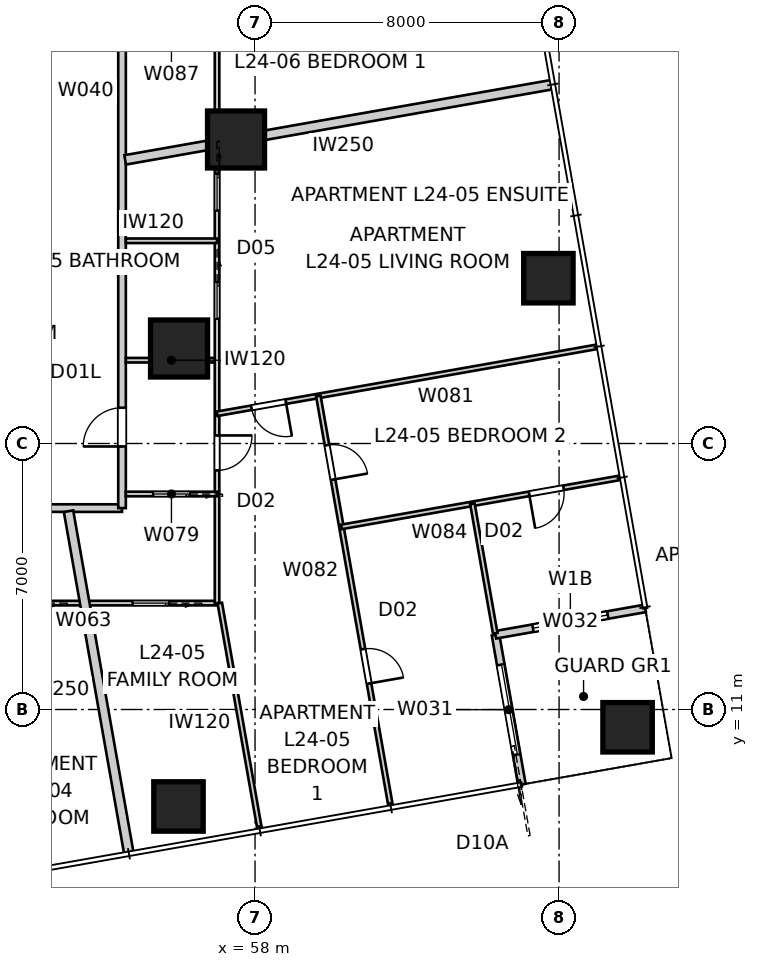
"""IFC4 building model, lengths in metres.
Left out: names, types, materials, properties, quantities, classifications, styles, units other than length and angle.
Written with IfcOpenShell. Run it as: python <this file> out.ifc"""

import sys

from ifc_helpers import new_model, si_unit, direction, frame, frame_2d, origin, origin_2d, place, context, subcontext, project, spatial, rectangle, extrude, element, fill, save


model = new_model("IFC4")
c1 = context("Model", 3, precision=1e-05, world=origin(), true_north=direction((0.0, 1.0)))
c2 = subcontext(c1, "Body", "Model", "MODEL_VIEW")
j1 = project(units=[si_unit("LENGTHUNIT", "METRE"), si_unit("PLANEANGLEUNIT", "RADIAN")], contexts=[c1])
p1 = place(None, origin())
s1 = spatial("IfcSite", under=j1, at=p1, CompositionType="ELEMENT")
p2 = place(p1, origin())
s2 = spatial("IfcBuilding", under=s1, at=p2, CompositionType="ELEMENT")
p3 = place(p2, frame((0.0, 0.0, 89.6)))
s3 = spatial("IfcBuildingStorey", under=s2, at=p3, CompositionType="ELEMENT", Elevation=89.6)
for number, where, z_axis, x_axis in (
    (1, (55.985, 8.448, 0.0), (0.0, 0.0, 1.0), (1.0, 0.0, 0.0)),
    (2, (67.803, 10.532, 0.0), (0.0, 0.0, 1.0), (1.0, 0.0, 0.0)),
    (3, (65.719, 22.35, 0.0), (0.0, 0.0, 1.0), (1.0, 0.0, 0.0)),
):
    element("IfcColumn", number, at=place(p3, frame(where, z_axis=z_axis, x_axis=x_axis)), inside=s3, PredefinedType="COLUMN", context=c2, shape_type="SweptSolid", body=[
        extrude(rectangle(XDim=1.3, YDim=1.3, at=origin_2d()), origin(), (0.0, 0.0, 1.0), 3.4),
    ])
for number, where, z_axis, x_axis in (
    (4, (57.5, 26.0, 0.0), (0.0, 0.0, 1.0), (1.0, 0.0, 0.0)),
    (5, (56.0, 20.5, 0.0), (0.0, 0.0, 1.0), (1.0, 0.0, 0.0)),
):
    element("IfcColumn", number, at=place(p3, frame(where, z_axis=z_axis, x_axis=x_axis)), inside=s3, PredefinedType="COLUMN", context=c2, shape_type="SweptSolid", body=[
        extrude(rectangle(XDim=1.5, YDim=1.5, at=origin_2d()), origin(), (0.0, 0.0, 1.0), 3.4),
    ])
p4 = place(p3, frame((65.022, 9.026, 0.0), z_axis=(0.0, 0.0, 1.0), x_axis=(-0.173646056486, 0.984808127031, 0.0)))
e6 = element("IfcWall", 6, at=p4, inside=s3, PredefinedType="SOLIDWALL", context=c2, shape_type="SweptSolid", body=[
    extrude(rectangle(XDim=4.0, YDim=0.2, at=frame_2d((2.0, 0.0))), origin(), (0.0, 0.0, 1.0), 3.25),
])
p5 = place(p4, frame((0.8, 0.0, 0.0)))
e7 = element("IfcOpeningElement", 7, at=p5, cuts=e6, PredefinedType="OPENING", context=c2, shape_type="SweptSolid", body=[
    extrude(rectangle(XDim=2.4, YDim=2.1, at=frame_2d((1.2, 1.05))), frame((0.0, 0.11, 0.0), z_axis=(0.0, -1.0, 0.0), x_axis=(1.0, 0.0, 0.0)), (0.0, 0.0, 1.0), 0.22),
])
p6 = place(p3, frame((64.328, 12.966, 0.0), z_axis=(0.0, 0.0, 1.0), x_axis=(0.984808127031, 0.173646056486, 0.0)))
e8 = element("IfcWall", 8, at=p6, inside=s3, PredefinedType="SOLIDWALL", context=c2, shape_type="SweptSolid", body=[
    extrude(rectangle(XDim=4.0, YDim=0.2, at=frame_2d((2.0, 0.0))), origin(), (0.0, 0.0, 1.0), 3.25),
])
p7 = place(p6, frame((1.0, 0.0, 0.45)))
e9 = element("IfcOpeningElement", 9, at=p7, cuts=e8, PredefinedType="OPENING", context=c2, shape_type="SweptSolid", body=[
    extrude(rectangle(XDim=2.0, YDim=1.8, at=frame_2d((1.0, 0.9))), frame((0.0, 0.11, 0.0), z_axis=(0.0, -1.0, 0.0), x_axis=(1.0, 0.0, 0.0)), (0.0, 0.0, 1.0), 0.22),
])
p8 = place(p3, frame((25.5, 16.3, 0.0), z_axis=(0.0, 0.0, 1.0), x_axis=(1.0, 0.0, 0.0)))
e10 = element("IfcWall", 10, at=p8, inside=s3, PredefinedType="PARTITIONING", context=c2, shape_type="SweptSolid", body=[
    extrude(rectangle(XDim=29.0, YDim=0.2, at=frame_2d((14.5, 0.0))), origin(), (0.0, 0.0, 1.0), 3.25),
])
p9 = place(p8, frame((20.896, 0.0, 0.0)))
e11 = element("IfcOpeningElement", 11, at=p9, cuts=e10, PredefinedType="OPENING", context=c2, shape_type="SweptSolid", body=[
    extrude(rectangle(XDim=1.02, YDim=2.34, at=frame_2d((0.51, 1.17))), frame((0.0, 0.11, 0.0), z_axis=(0.0, -1.0, 0.0), x_axis=(1.0, 0.0, 0.0)), (0.0, 0.0, 1.0), 0.22),
])
p10 = place(p8, frame((14.257, 0.0, 0.0)))
e12 = element("IfcOpeningElement", 12, at=p10, cuts=e10, PredefinedType="OPENING", context=c2, shape_type="SweptSolid", body=[
    extrude(rectangle(XDim=1.02, YDim=2.34, at=frame_2d((0.51, 1.17))), frame((0.0, 0.11, 0.0), z_axis=(0.0, -1.0, 0.0), x_axis=(1.0, 0.0, 0.0)), (0.0, 0.0, 1.0), 0.22),
])
p11 = place(p8, frame((3.857, 0.0, 0.0)))
e13 = element("IfcOpeningElement", 13, at=p11, cuts=e10, PredefinedType="OPENING", context=c2, shape_type="SweptSolid", body=[
    extrude(rectangle(XDim=1.02, YDim=2.34, at=frame_2d((0.51, 1.17))), frame((0.0, 0.11, 0.0), z_axis=(0.0, -1.0, 0.0), x_axis=(1.0, 0.0, 0.0)), (0.0, 0.0, 1.0), 0.22),
])
p12 = place(p3, frame((54.5, 16.3, 0.0), z_axis=(0.0, 0.0, 1.0), x_axis=(0.0, 1.0, 0.0)))
e14 = element("IfcWall", 14, at=p12, inside=s3, PredefinedType="PARTITIONING", context=c2, shape_type="SweptSolid", body=[
    extrude(rectangle(XDim=27.4, YDim=0.2, at=frame_2d((13.7, 0.0))), origin(), (0.0, 0.0, 1.0), 3.25),
])
p13 = place(p12, frame((19.308, 0.0, 0.0)))
e15 = element("IfcOpeningElement", 15, at=p13, cuts=e14, PredefinedType="OPENING", context=c2, shape_type="SweptSolid", body=[
    extrude(rectangle(XDim=1.02, YDim=2.34, at=frame_2d((0.51, 1.17))), frame((0.0, 0.11, 0.0), z_axis=(0.0, -1.0, 0.0), x_axis=(1.0, 0.0, 0.0)), (0.0, 0.0, 1.0), 0.22),
])
p14 = place(p12, frame((24.687, 0.0, 0.0)))
e16 = element("IfcOpeningElement", 16, at=p14, cuts=e14, PredefinedType="OPENING", context=c2, shape_type="SweptSolid", body=[
    extrude(rectangle(XDim=1.02, YDim=2.1, at=frame_2d((0.51, 1.05))), frame((0.0, 0.11, 0.0), z_axis=(0.0, -1.0, 0.0), x_axis=(1.0, 0.0, 0.0)), (0.0, 0.0, 1.0), 0.22),
])
p15 = place(p12, frame((1.622, 0.0, 0.0)))
e17 = element("IfcOpeningElement", 17, at=p15, cuts=e14, PredefinedType="OPENING", context=c2, shape_type="SweptSolid", body=[
    extrude(rectangle(XDim=1.02, YDim=2.1, at=frame_2d((0.51, 1.05))), frame((0.0, 0.11, 0.0), z_axis=(0.0, -1.0, 0.0), x_axis=(1.0, 0.0, 0.0)), (0.0, 0.0, 1.0), 0.22),
])
p16 = place(p3, frame((65.836, 27.448, 0.0), z_axis=(0.0, 0.0, 1.0), x_axis=(-0.98481000304, -0.173635416642, 0.0)))
e18 = element("IfcWall", 18, at=p16, inside=s3, PredefinedType="PARTITIONING", context=c2, shape_type="SweptSolid", body=[
    extrude(rectangle(XDim=11.427, YDim=0.25, at=frame_2d((5.713, 0.0))), origin(), (0.0, 0.0, 1.0), 3.25),
])
p17 = place(p3, frame((54.682, 7.203, 0.0), z_axis=(0.0, 0.0, 1.0), x_axis=(-0.173630137029, 0.984810933893, 0.0)))
e19 = element("IfcWall", 19, at=p17, inside=s3, PredefinedType="PARTITIONING", context=c2, shape_type="SweptSolid", body=[
    extrude(rectangle(XDim=9.154, YDim=0.25, at=frame_2d((4.577, 0.0))), origin(), (0.0, 0.0, 1.0), 3.25),
])
p18 = place(p3, frame((57.0, 13.8, 0.0), z_axis=(0.0, 0.0, 1.0), x_axis=(-1.0, 0.0, 0.0)))
e20 = element("IfcWall", 20, at=p18, inside=s3, PredefinedType="PARTITIONING", context=c2, shape_type="SweptSolid", body=[
    extrude(rectangle(XDim=34.0, YDim=0.12, at=frame_2d((17.0, 0.0))), origin(), (0.0, 0.0, 1.0), 2.55),
])
p19 = place(p18, frame((8.768, 0.0, 0.0)))
e21 = element("IfcOpeningElement", 21, at=p19, cuts=e20, PredefinedType="OPENING", context=c2, shape_type="SweptSolid", body=[
    extrude(rectangle(XDim=0.92, YDim=2.34, at=frame_2d((0.46, 1.17))), frame((0.0, 0.07, 0.0), z_axis=(0.0, -1.0, 0.0), x_axis=(1.0, 0.0, 0.0)), (0.0, 0.0, 1.0), 0.14),
])
p20 = place(p18, frame((10.995, 0.0, 0.0)))
e22 = element("IfcOpeningElement", 22, at=p20, cuts=e20, PredefinedType="OPENING", context=c2, shape_type="SweptSolid", body=[
    extrude(rectangle(XDim=0.92, YDim=2.34, at=frame_2d((0.46, 1.17))), frame((0.0, 0.07, 0.0), z_axis=(0.0, -1.0, 0.0), x_axis=(1.0, 0.0, 0.0)), (0.0, 0.0, 1.0), 0.14),
])
p21 = place(p18, frame((15.486, 0.0, 0.0)))
e23 = element("IfcOpeningElement", 23, at=p21, cuts=e20, PredefinedType="OPENING", context=c2, shape_type="SweptSolid", body=[
    extrude(rectangle(XDim=0.92, YDim=2.34, at=frame_2d((0.46, 1.17))), frame((0.0, 0.07, 0.0), z_axis=(0.0, -1.0, 0.0), x_axis=(1.0, 0.0, 0.0)), (0.0, 0.0, 1.0), 0.14),
])
p22 = place(p18, frame((4.804, 0.0, 0.0)))
e24 = element("IfcOpeningElement", 24, at=p22, cuts=e20, PredefinedType="OPENING", context=c2, shape_type="SweptSolid", body=[
    extrude(rectangle(XDim=0.96, YDim=2.1, at=frame_2d((0.48, 1.05))), frame((0.0, 0.07, 0.0), z_axis=(0.0, -1.0, 0.0), x_axis=(1.0, 0.0, 0.0)), (0.0, 0.0, 1.0), 0.14),
])
p23 = place(p18, frame((19.155, 0.0, 0.0)))
e25 = element("IfcOpeningElement", 25, at=p23, cuts=e20, PredefinedType="OPENING", context=c2, shape_type="SweptSolid", body=[
    extrude(rectangle(XDim=0.96, YDim=2.1, at=frame_2d((0.48, 1.05))), frame((0.0, 0.07, 0.0), z_axis=(0.0, -1.0, 0.0), x_axis=(1.0, 0.0, 0.0)), (0.0, 0.0, 1.0), 0.14),
])
p24 = place(p18, frame((31.473, 0.0, 0.0)))
e26 = element("IfcOpeningElement", 26, at=p24, cuts=e20, PredefinedType="OPENING", context=c2, shape_type="SweptSolid", body=[
    extrude(rectangle(XDim=0.96, YDim=2.1, at=frame_2d((0.48, 1.05))), frame((0.0, 0.07, 0.0), z_axis=(0.0, -1.0, 0.0), x_axis=(1.0, 0.0, 0.0)), (0.0, 0.0, 1.0), 0.14),
])
p25 = place(p18, frame((1.261, 0.0, 0.0)))
e27 = element("IfcOpeningElement", 27, at=p25, cuts=e20, PredefinedType="OPENING", context=c2, shape_type="SweptSolid", body=[
    extrude(rectangle(XDim=0.96, YDim=2.1, at=frame_2d((0.48, 1.05))), frame((0.0, 0.07, 0.0), z_axis=(0.0, -1.0, 0.0), x_axis=(1.0, 0.0, 0.0)), (0.0, 0.0, 1.0), 0.14),
])
p26 = place(p18, frame((22.627, 0.0, 0.0)))
e28 = element("IfcOpeningElement", 28, at=p26, cuts=e20, PredefinedType="OPENING", context=c2, shape_type="SweptSolid", body=[
    extrude(rectangle(XDim=0.96, YDim=2.1, at=frame_2d((0.48, 1.05))), frame((0.0, 0.07, 0.0), z_axis=(0.0, -1.0, 0.0), x_axis=(1.0, 0.0, 0.0)), (0.0, 0.0, 1.0), 0.14),
])
p27 = place(p3, frame((54.6, 20.192, 0.0), z_axis=(0.0, 0.0, 1.0), x_axis=(1.0, 0.0, 0.0)))
e29 = element("IfcWall", 29, at=p27, inside=s3, PredefinedType="PARTITIONING", context=c2, shape_type="SweptSolid", body=[
    extrude(rectangle(XDim=2.4, YDim=0.12, at=frame_2d((1.2, 0.0))), origin(), (0.0, 0.0, 1.0), 3.25),
])
p28 = place(p3, frame((57.0, 46.2, 0.0), z_axis=(0.0, 0.0, 1.0), x_axis=(0.0, -1.0, 0.0)))
e30 = element("IfcWall", 30, at=p28, inside=s3, PredefinedType="PARTITIONING", context=c2, shape_type="SweptSolid", body=[
    extrude(rectangle(XDim=32.4, YDim=0.12, at=frame_2d((16.2, 0.0))), origin(), (0.0, 0.0, 1.0), 2.55),
])
p29 = place(p28, frame((10.396, 0.0, 0.0)))
e31 = element("IfcOpeningElement", 31, at=p29, cuts=e30, PredefinedType="OPENING", context=c2, shape_type="SweptSolid", body=[
    extrude(rectangle(XDim=0.92, YDim=2.34, at=frame_2d((0.46, 1.17))), frame((0.0, 0.07, 0.0), z_axis=(0.0, -1.0, 0.0), x_axis=(1.0, 0.0, 0.0)), (0.0, 0.0, 1.0), 0.14),
])
p30 = place(p28, frame((7.587, 0.0, 0.0)))
e32 = element("IfcOpeningElement", 32, at=p30, cuts=e30, PredefinedType="OPENING", context=c2, shape_type="SweptSolid", body=[
    extrude(rectangle(XDim=0.92, YDim=2.34, at=frame_2d((0.46, 1.17))), frame((0.0, 0.07, 0.0), z_axis=(0.0, -1.0, 0.0), x_axis=(1.0, 0.0, 0.0)), (0.0, 0.0, 1.0), 0.14),
])
p31 = place(p28, frame((3.843, 0.0, 0.0)))
e33 = element("IfcOpeningElement", 33, at=p31, cuts=e30, PredefinedType="OPENING", context=c2, shape_type="SweptSolid", body=[
    extrude(rectangle(XDim=0.92, YDim=2.34, at=frame_2d((0.46, 1.17))), frame((0.0, 0.07, 0.0), z_axis=(0.0, -1.0, 0.0), x_axis=(1.0, 0.0, 0.0)), (0.0, 0.0, 1.0), 0.14),
])
p32 = place(p28, frame((27.988, 0.0, 0.0)))
e34 = element("IfcOpeningElement", 34, at=p32, cuts=e30, PredefinedType="OPENING", context=c2, shape_type="SweptSolid", body=[
    extrude(rectangle(XDim=0.92, YDim=2.34, at=frame_2d((0.46, 1.17))), frame((0.0, 0.07, 0.0), z_axis=(0.0, -1.0, 0.0), x_axis=(1.0, 0.0, 0.0)), (0.0, 0.0, 1.0), 0.14),
])
p33 = place(p28, frame((23.957, 0.0, 0.0)))
e35 = element("IfcOpeningElement", 35, at=p33, cuts=e30, PredefinedType="OPENING", context=c2, shape_type="SweptSolid", body=[
    extrude(rectangle(XDim=0.96, YDim=2.1, at=frame_2d((0.48, 1.05))), frame((0.0, 0.07, 0.0), z_axis=(0.0, -1.0, 0.0), x_axis=(1.0, 0.0, 0.0)), (0.0, 0.0, 1.0), 0.14),
])
p34 = place(p28, frame((21.108, 0.0, 0.0)))
e36 = element("IfcOpeningElement", 36, at=p34, cuts=e30, PredefinedType="OPENING", context=c2, shape_type="SweptSolid", body=[
    extrude(rectangle(XDim=0.96, YDim=2.1, at=frame_2d((0.48, 1.05))), frame((0.0, 0.07, 0.0), z_axis=(0.0, -1.0, 0.0), x_axis=(1.0, 0.0, 0.0)), (0.0, 0.0, 1.0), 0.14),
])
p35 = place(p3, frame((57.0, 16.671, 0.0), z_axis=(0.0, 0.0, 1.0), x_axis=(-1.0, 0.0, 0.0)))
e37 = element("IfcWall", 37, at=p35, inside=s3, PredefinedType="PARTITIONING", context=c2, shape_type="SweptSolid", body=[
    extrude(rectangle(XDim=2.4, YDim=0.12, at=frame_2d((1.2, 0.0))), origin(), (0.0, 0.0, 1.0), 3.25),
])
p36 = place(p35, frame((0.72, 0.0, 0.0)))
e38 = element("IfcOpeningElement", 38, at=p36, cuts=e37, PredefinedType="OPENING", context=c2, shape_type="SweptSolid", body=[
    extrude(rectangle(XDim=0.96, YDim=2.1, at=frame_2d((0.48, 1.05))), frame((0.0, 0.07, 0.0), z_axis=(0.0, -1.0, 0.0), x_axis=(1.0, 0.0, 0.0)), (0.0, 0.0, 1.0), 0.14),
])
p37 = place(p3, frame((54.6, 23.335, 0.0), z_axis=(0.0, 0.0, 1.0), x_axis=(1.0, 0.0, 0.0)))
e39 = element("IfcWall", 39, at=p37, inside=s3, PredefinedType="PARTITIONING", context=c2, shape_type="SweptSolid", body=[
    extrude(rectangle(XDim=2.4, YDim=0.12, at=frame_2d((1.2, 0.0))), origin(), (0.0, 0.0, 1.0), 3.25),
])
p38 = place(p3, frame((67.012, 20.547, 0.0), z_axis=(0.0, 0.0, 1.0), x_axis=(-0.984807724889, -0.173648337162, 0.0)))
e40 = element("IfcWall", 40, at=p38, inside=s3, PredefinedType="PARTITIONING", context=c2, shape_type="SweptSolid", body=[
    extrude(rectangle(XDim=10.167, YDim=0.12, at=frame_2d((5.083, 0.0))), origin(), (0.0, 0.0, 1.0), 2.638),
])
p39 = place(p38, frame((8.328, 0.0, 0.0)))
e41 = element("IfcOpeningElement", 41, at=p39, cuts=e40, PredefinedType="OPENING", context=c2, shape_type="SweptSolid", body=[
    extrude(rectangle(XDim=0.92, YDim=2.34, at=frame_2d((0.46, 1.17))), frame((0.0, 0.07, 0.0), z_axis=(0.0, -1.0, 0.0), x_axis=(1.0, 0.0, 0.0)), (0.0, 0.0, 1.0), 0.14),
])
p40 = place(p3, frame((59.665, 19.251, 0.0), z_axis=(0.0, 0.0, 1.0), x_axis=(0.173639194339, -0.984809336973, 0.0)))
e42 = element("IfcWall", 42, at=p40, inside=s3, PredefinedType="PARTITIONING", context=c2, shape_type="SweptSolid", body=[
    extrude(rectangle(XDim=10.96, YDim=0.12, at=frame_2d((5.48, 0.0))), origin(), (0.0, 0.0, 1.0), 3.25),
])
p41 = place(p40, frame((6.765, 0.0, 0.0)))
e43 = element("IfcOpeningElement", 43, at=p41, cuts=e42, PredefinedType="OPENING", context=c2, shape_type="SweptSolid", body=[
    extrude(rectangle(XDim=0.92, YDim=2.34, at=frame_2d((0.46, 1.17))), frame((0.0, 0.07, 0.0), z_axis=(0.0, -1.0, 0.0), x_axis=(1.0, 0.0, 0.0)), (0.0, 0.0, 1.0), 0.14),
])
p42 = place(p40, frame((1.315, 0.0, 0.0)))
e44 = element("IfcOpeningElement", 44, at=p42, cuts=e42, PredefinedType="OPENING", context=c2, shape_type="SweptSolid", body=[
    extrude(rectangle(XDim=0.92, YDim=2.34, at=frame_2d((0.46, 1.17))), frame((0.0, 0.07, 0.0), z_axis=(0.0, -1.0, 0.0), x_axis=(1.0, 0.0, 0.0)), (0.0, 0.0, 1.0), 0.14),
])
p43 = place(p3, frame((58.122, 7.85, 0.0), z_axis=(0.0, 0.0, 1.0), x_axis=(-0.173644708382, 0.984808364734, 0.0)))
e45 = element("IfcWall", 45, at=p43, inside=s3, PredefinedType="PARTITIONING", context=c2, shape_type="SweptSolid", body=[
    extrude(rectangle(XDim=6.042, YDim=0.12, at=frame_2d((3.021, 0.0))), origin(), (0.0, 0.0, 1.0), 2.638),
])
p44 = place(p3, frame((67.62, 17.1, 0.0), z_axis=(0.0, 0.0, 1.0), x_axis=(-0.984807929323, -0.173647177755, 0.0)))
e46 = element("IfcWall", 46, at=p44, inside=s3, PredefinedType="PARTITIONING", context=c2, shape_type="SweptSolid", body=[
    extrude(rectangle(XDim=7.46, YDim=0.12, at=frame_2d((3.73, 0.0))), origin(), (0.0, 0.0, 1.0), 3.25),
])
p45 = place(p44, frame((1.525, 0.0, 0.0)))
e47 = element("IfcOpeningElement", 47, at=p45, cuts=e46, PredefinedType="OPENING", context=c2, shape_type="SweptSolid", body=[
    extrude(rectangle(XDim=0.92, YDim=2.34, at=frame_2d((0.46, 1.17))), frame((0.0, 0.07, 0.0), z_axis=(0.0, -1.0, 0.0), x_axis=(1.0, 0.0, 0.0)), (0.0, 0.0, 1.0), 0.14),
])
p46 = place(p3, frame((63.72, 16.412, 0.0), z_axis=(0.0, 0.0, 1.0), x_axis=(0.173660541335, -0.984805572884, 0.0)))
e48 = element("IfcWall", 48, at=p46, inside=s3, PredefinedType="PARTITIONING", context=c2, shape_type="SweptSolid", body=[
    extrude(rectangle(XDim=3.46, YDim=0.12, at=frame_2d((1.73, 0.0))), origin(), (0.0, 0.0, 1.0), 3.25),
])
p47 = place(p5, origin())
e49 = element("IfcDoor", 49, at=p47, inside=s3, OperationType="SLIDING_TO_LEFT", PredefinedType="DOOR", context=c2, shape_type="SweptSolid", body=[
    extrude(rectangle(XDim=2.4, YDim=2.1, at=frame_2d((1.2, 1.05))), frame((0.0, 0.025, 0.0), z_axis=(0.0, -1.0, 0.0), x_axis=(1.0, 0.0, 0.0)), (0.0, 0.0, 1.0), 0.05),
])
fill(e7, e49)
p48 = place(p7, origin())
e50 = element("IfcWindow", 50, at=p48, inside=s3, PartitioningType="SINGLE_PANEL", PredefinedType="WINDOW", context=c2, shape_type="SweptSolid", body=[
    extrude(rectangle(XDim=2.0, YDim=1.8, at=frame_2d((1.0, 0.9))), frame((0.0, 0.03, 0.0), z_axis=(0.0, -1.0, 0.0), x_axis=(1.0, 0.0, 0.0)), (0.0, 0.0, 1.0), 0.06),
])
fill(e9, e50)
p49 = place(p15, origin())
e51 = element("IfcDoor", 51, at=p49, inside=s3, OperationType="SINGLE_SWING_LEFT", PredefinedType="DOOR", context=c2, shape_type="SweptSolid", body=[
    extrude(rectangle(XDim=1.02, YDim=2.1, at=frame_2d((0.51, 1.05))), frame((0.0, 0.025, 0.0), z_axis=(0.0, -1.0, 0.0), x_axis=(1.0, 0.0, 0.0)), (0.0, 0.0, 1.0), 0.05),
])
fill(e17, e51)
p50 = place(p36, origin())
e52 = element("IfcDoor", 52, at=p50, inside=s3, OperationType="SLIDING_TO_LEFT", PredefinedType="DOOR", context=c2, shape_type="SweptSolid", body=[
    extrude(rectangle(XDim=0.96, YDim=2.1, at=frame_2d((0.48, 1.05))), frame((0.0, 0.025, 0.0), z_axis=(0.0, -1.0, 0.0), x_axis=(1.0, 0.0, 0.0)), (0.0, 0.0, 1.0), 0.05),
])
fill(e38, e52)
p51 = place(p32, origin())
e53 = element("IfcDoor", 53, at=p51, inside=s3, OperationType="SINGLE_SWING_LEFT", PredefinedType="DOOR", context=c2, shape_type="SweptSolid", body=[
    extrude(rectangle(XDim=0.92, YDim=2.34, at=frame_2d((0.46, 1.17))), frame((0.0, 0.025, 0.0), z_axis=(0.0, -1.0, 0.0), x_axis=(1.0, 0.0, 0.0)), (0.0, 0.0, 1.0), 0.05),
])
fill(e34, e53)
p52 = place(p25, origin())
e54 = element("IfcDoor", 54, at=p52, inside=s3, OperationType="SLIDING_TO_LEFT", PredefinedType="DOOR", context=c2, shape_type="SweptSolid", body=[
    extrude(rectangle(XDim=0.96, YDim=2.1, at=frame_2d((0.48, 1.05))), frame((0.0, 0.025, 0.0), z_axis=(0.0, -1.0, 0.0), x_axis=(1.0, 0.0, 0.0)), (0.0, 0.0, 1.0), 0.05),
])
fill(e27, e54)
p53 = place(p41, origin())
e55 = element("IfcDoor", 55, at=p53, inside=s3, OperationType="SINGLE_SWING_RIGHT", PredefinedType="DOOR", context=c2, shape_type="SweptSolid", body=[
    extrude(rectangle(XDim=0.92, YDim=2.34, at=frame_2d((0.46, 1.17))), frame((0.0, 0.025, 0.0), z_axis=(0.0, -1.0, 0.0), x_axis=(1.0, 0.0, 0.0)), (0.0, 0.0, 1.0), 0.05),
])
fill(e43, e55)
p54 = place(p42, origin())
e56 = element("IfcDoor", 56, at=p54, inside=s3, OperationType="SINGLE_SWING_RIGHT", PredefinedType="DOOR", context=c2, shape_type="SweptSolid", body=[
    extrude(rectangle(XDim=0.92, YDim=2.34, at=frame_2d((0.46, 1.17))), frame((0.0, 0.025, 0.0), z_axis=(0.0, -1.0, 0.0), x_axis=(1.0, 0.0, 0.0)), (0.0, 0.0, 1.0), 0.05),
])
fill(e44, e56)
p55 = place(p39, origin())
e57 = element("IfcDoor", 57, at=p55, inside=s3, OperationType="SINGLE_SWING_LEFT", PredefinedType="DOOR", context=c2, shape_type="SweptSolid", body=[
    extrude(rectangle(XDim=0.92, YDim=2.34, at=frame_2d((0.46, 1.17))), frame((0.0, 0.025, 0.0), z_axis=(0.0, -1.0, 0.0), x_axis=(1.0, 0.0, 0.0)), (0.0, 0.0, 1.0), 0.05),
])
fill(e41, e57)
p56 = place(p33, origin())
e58 = element("IfcDoor", 58, at=p56, inside=s3, OperationType="SLIDING_TO_LEFT", PredefinedType="DOOR", context=c2, shape_type="SweptSolid", body=[
    extrude(rectangle(XDim=0.96, YDim=2.1, at=frame_2d((0.48, 1.05))), frame((0.0, 0.025, 0.0), z_axis=(0.0, -1.0, 0.0), x_axis=(1.0, 0.0, 0.0)), (0.0, 0.0, 1.0), 0.05),
])
fill(e35, e58)
p57 = place(p34, origin())
e59 = element("IfcDoor", 59, at=p57, inside=s3, OperationType="SLIDING_TO_LEFT", PredefinedType="DOOR", context=c2, shape_type="SweptSolid", body=[
    extrude(rectangle(XDim=0.96, YDim=2.1, at=frame_2d((0.48, 1.05))), frame((0.0, 0.025, 0.0), z_axis=(0.0, -1.0, 0.0), x_axis=(1.0, 0.0, 0.0)), (0.0, 0.0, 1.0), 0.05),
])
fill(e36, e59)
p58 = place(p45, origin())
e60 = element("IfcDoor", 60, at=p58, inside=s3, OperationType="SINGLE_SWING_RIGHT", PredefinedType="DOOR", context=c2, shape_type="SweptSolid", body=[
    extrude(rectangle(XDim=0.92, YDim=2.34, at=frame_2d((0.46, 1.17))), frame((0.0, 0.025, 0.0), z_axis=(0.0, -1.0, 0.0), x_axis=(1.0, 0.0, 0.0)), (0.0, 0.0, 1.0), 0.05),
])
fill(e47, e60)
save(model, sys.argv[1])
